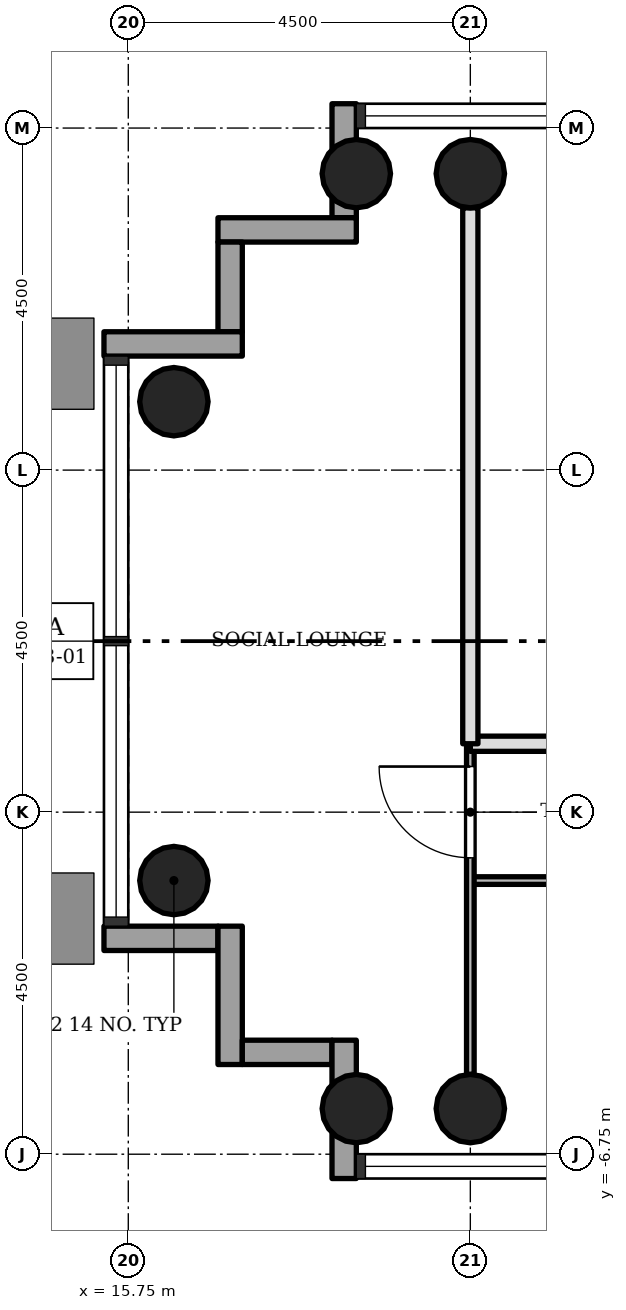
"""IFC4 building model, lengths in metres.
Left out: names, types, materials, properties, quantities, classifications, styles, units other than length and angle.
Written with IfcOpenShell. Run it as: python <this file> out.ifc"""

import sys

from ifc_helpers import new_model, si_unit, direction, frame, frame_2d, origin, origin_2d, place, context, subcontext, project, spatial, rectangle, hollow_circle, extrude, element, fill, save


model = new_model("IFC4")
c1 = context("Model", 3, precision=1e-05, world=origin(), true_north=direction((0.0, 1.0)))
c2 = subcontext(c1, "Body", "Model", "MODEL_VIEW")
j1 = project(units=[si_unit("LENGTHUNIT", "METRE"), si_unit("PLANEANGLEUNIT", "RADIAN")], contexts=[c1])
p1 = place(None, origin())
s1 = spatial("IfcSite", under=j1, at=p1, CompositionType="ELEMENT")
p2 = place(p1, origin())
s2 = spatial("IfcBuilding", under=s1, at=p2, CompositionType="ELEMENT")
p3 = place(p2, frame((0.0, 0.0, 80.0)))
s3 = spatial("IfcBuildingStorey", under=s2, at=p3, CompositionType="ELEMENT", Elevation=80.0)
for number, where, z_axis, x_axis in (
    (1, (20.25, 6.15, 0.0), (0.0, 0.0, 1.0), (1.0, 0.0, 0.0)),
    (2, (20.25, -6.15, 0.0), (0.0, 0.0, 1.0), (1.0, 0.0, 0.0)),
    (3, (18.75, 6.15, 0.0), (0.0, 0.0, 1.0), (1.0, 0.0, 0.0)),
    (4, (18.75, -6.15, 0.0), (0.0, 0.0, 1.0), (1.0, 0.0, 0.0)),
    (5, (16.35, 3.15, 0.0), (0.0, 0.0, 1.0), (1.0, 0.0, 0.0)),
    (6, (16.35, -3.15, 0.0), (0.0, 0.0, 1.0), (1.0, 0.0, 0.0)),
):
    element("IfcColumn", number, at=place(p3, frame(where, z_axis=z_axis, x_axis=x_axis)), inside=s3, PredefinedType="COLUMN", context=c2, shape_type="SweptSolid", body=[
        extrude(hollow_circle(Radius=0.45, WallThickness=0.032, at=origin_2d()), origin(), (0.0, 0.0, 1.0), 3.4),
    ])
p4 = place(p3, frame((18.59, 7.07, -0.3), z_axis=(0.0, 0.0, 1.0), x_axis=(0.0, -1.0, 0.0)))
e7 = element("IfcWall", 7, at=p4, inside=s3, PredefinedType="STANDARD", context=c2, shape_type="SweptSolid", body=[
    extrude(rectangle(XDim=1.5, YDim=0.32, at=frame_2d((0.75, 0.0))), origin(), (0.0, 0.0, 1.0), 3.4),
])
p5 = place(p3, frame((18.75, 5.41, -0.3), z_axis=(0.0, 0.0, 1.0), x_axis=(-1.0, 0.0, 0.0)))
e8 = element("IfcWall", 8, at=p5, inside=s3, PredefinedType="STANDARD", context=c2, shape_type="SweptSolid", body=[
    extrude(rectangle(XDim=1.82, YDim=0.32, at=frame_2d((0.91, 0.0))), origin(), (0.0, 0.0, 1.0), 3.4),
])
p6 = place(p3, frame((17.09, 5.25, -0.3), z_axis=(0.0, 0.0, 1.0), x_axis=(0.0, -1.0, 0.0)))
e9 = element("IfcWall", 9, at=p6, inside=s3, PredefinedType="STANDARD", context=c2, shape_type="SweptSolid", body=[
    extrude(rectangle(XDim=1.18, YDim=0.32, at=frame_2d((0.59, 0.0))), origin(), (0.0, 0.0, 1.0), 3.4),
])
p7 = place(p3, frame((17.25, 3.91, -0.3), z_axis=(0.0, 0.0, 1.0), x_axis=(-1.0, 0.0, 0.0)))
e10 = element("IfcWall", 10, at=p7, inside=s3, PredefinedType="STANDARD", context=c2, shape_type="SweptSolid", body=[
    extrude(rectangle(XDim=1.82, YDim=0.32, at=frame_2d((0.91, 0.0))), origin(), (0.0, 0.0, 1.0), 3.4),
])
p8 = place(p3, frame((15.43, -3.91, -0.3), z_axis=(0.0, 0.0, 1.0), x_axis=(1.0, 0.0, 0.0)))
e11 = element("IfcWall", 11, at=p8, inside=s3, PredefinedType="STANDARD", context=c2, shape_type="SweptSolid", body=[
    extrude(rectangle(XDim=1.5, YDim=0.32, at=frame_2d((0.75, 0.0))), origin(), (0.0, 0.0, 1.0), 3.4),
])
p9 = place(p3, frame((17.09, -3.75, -0.3), z_axis=(0.0, 0.0, 1.0), x_axis=(0.0, -1.0, 0.0)))
e12 = element("IfcWall", 12, at=p9, inside=s3, PredefinedType="STANDARD", context=c2, shape_type="SweptSolid", body=[
    extrude(rectangle(XDim=1.82, YDim=0.32, at=frame_2d((0.91, 0.0))), origin(), (0.0, 0.0, 1.0), 3.4),
])
p10 = place(p3, frame((17.25, -5.41, -0.3), z_axis=(0.0, 0.0, 1.0), x_axis=(1.0, 0.0, 0.0)))
e13 = element("IfcWall", 13, at=p10, inside=s3, PredefinedType="STANDARD", context=c2, shape_type="SweptSolid", body=[
    extrude(rectangle(XDim=1.18, YDim=0.32, at=frame_2d((0.59, 0.0))), origin(), (0.0, 0.0, 1.0), 3.4),
])
p11 = place(p3, frame((18.59, -5.25, -0.3), z_axis=(0.0, 0.0, 1.0), x_axis=(0.0, -1.0, 0.0)))
e14 = element("IfcWall", 14, at=p11, inside=s3, PredefinedType="STANDARD", context=c2, shape_type="SweptSolid", body=[
    extrude(rectangle(XDim=1.82, YDim=0.32, at=frame_2d((0.91, 0.0))), origin(), (0.0, 0.0, 1.0), 3.4),
])
p12 = place(p3, frame((29.25, -3.15, 0.0), z_axis=(0.0, 0.0, 1.0), x_axis=(-1.0, 0.0, 0.0)))
e15 = element("IfcWall", 15, at=p12, inside=s3, PredefinedType="PARTITIONING", context=c2, shape_type="SweptSolid", body=[
    extrude(rectangle(XDim=9.0, YDim=0.1, at=frame_2d((4.5, 0.0))), origin(), (0.0, 0.0, 1.0), 3.0),
])
p13 = place(p12, frame((2.55, 0.0, 0.0)))
e16 = element("IfcOpeningElement", 16, at=p13, cuts=e15, PredefinedType="OPENING", context=c2, shape_type="SweptSolid", body=[
    extrude(rectangle(XDim=0.9, YDim=2.1, at=frame_2d((0.45, 1.05))), frame((0.0, 0.06, 0.0), z_axis=(0.0, -1.0, 0.0), x_axis=(1.0, 0.0, 0.0)), (0.0, 0.0, 1.0), 0.12),
])
p14 = place(p3, frame((27.45, -1.35, 0.0), z_axis=(0.0, 0.0, 1.0), x_axis=(-1.0, 0.0, 0.0)))
e17 = element("IfcWall", 17, at=p14, inside=s3, PredefinedType="SOLIDWALL", context=c2, shape_type="SweptSolid", body=[
    extrude(rectangle(XDim=7.2, YDim=0.2, at=frame_2d((3.6, 0.0))), origin(), (0.0, 0.0, 1.0), 3.0),
])
p15 = place(p14, frame((4.35, 0.0, 0.0)))
e18 = element("IfcOpeningElement", 18, at=p15, cuts=e17, PredefinedType="OPENING", context=c2, shape_type="SweptSolid", body=[
    extrude(rectangle(XDim=0.9, YDim=2.1, at=frame_2d((0.45, 1.05))), frame((0.0, 0.11, 0.0), z_axis=(0.0, -1.0, 0.0), x_axis=(1.0, 0.0, 0.0)), (0.0, 0.0, 1.0), 0.22),
])
p16 = place(p3, frame((20.25, -5.7, 0.0), z_axis=(0.0, 0.0, 1.0), x_axis=(0.0, 1.0, 0.0)))
e19 = element("IfcWall", 19, at=p16, inside=s3, PredefinedType="PARTITIONING", context=c2, shape_type="SweptSolid", body=[
    extrude(rectangle(XDim=4.35, YDim=0.1, at=frame_2d((2.175, 0.0))), origin(), (0.0, 0.0, 1.0), 3.0),
])
p17 = place(p16, frame((2.85, 0.0, 0.0)))
e20 = element("IfcOpeningElement", 20, at=p17, cuts=e19, PredefinedType="OPENING", context=c2, shape_type="SweptSolid", body=[
    extrude(rectangle(XDim=1.2, YDim=2.1, at=frame_2d((0.6, 1.05))), frame((0.0, 0.06, 0.0), z_axis=(0.0, -1.0, 0.0), x_axis=(1.0, 0.0, 0.0)), (0.0, 0.0, 1.0), 0.12),
])
p18 = place(p3, frame((20.25, -1.35, 0.0), z_axis=(0.0, 0.0, 1.0), x_axis=(0.0, 1.0, 0.0)))
e21 = element("IfcWall", 21, at=p18, inside=s3, PredefinedType="SOLIDWALL", context=c2, shape_type="SweptSolid", body=[
    extrude(rectangle(XDim=7.05, YDim=0.2, at=frame_2d((3.525, 0.0))), origin(), (0.0, 0.0, 1.0), 3.0),
])
p19 = place(p17, origin())
e22 = element("IfcDoor", 22, at=p19, inside=s3, OperationType="SINGLE_SWING_LEFT", PredefinedType="DOOR", context=c2, shape_type="SweptSolid", body=[
    extrude(rectangle(XDim=1.2, YDim=2.1, at=frame_2d((0.6, 1.05))), frame((0.0, 0.025, 0.0), z_axis=(0.0, -1.0, 0.0), x_axis=(1.0, 0.0, 0.0)), (0.0, 0.0, 1.0), 0.05),
])
fill(e20, e22)
save(model, sys.argv[1])
